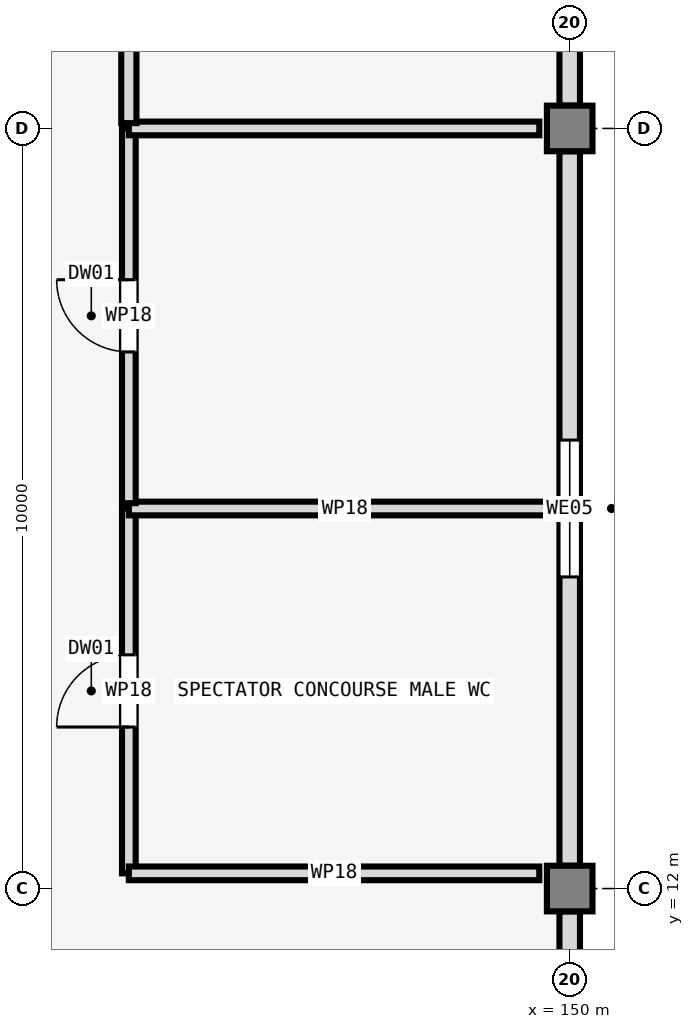
"""IFC4 building model, lengths in metres.
Left out: names, types, materials, properties, quantities, classifications, styles, units other than length and angle.
Written with IfcOpenShell. Run it as: python <this file> out.ifc"""

import sys

from ifc_helpers import new_model, si_unit, direction, frame, frame_2d, origin, origin_2d, place, context, subcontext, project, spatial, rectangle, extrude, element, fill, save


model = new_model("IFC4")
c1 = context("Model", 3, precision=1e-05, world=origin(), true_north=direction((0.0, 1.0)))
c2 = subcontext(c1, "Body", "Model", "MODEL_VIEW")
j1 = project(units=[si_unit("LENGTHUNIT", "METRE"), si_unit("PLANEANGLEUNIT", "RADIAN")], contexts=[c1])
p1 = place(None, origin())
s1 = spatial("IfcSite", under=j1, at=p1, CompositionType="ELEMENT")
p2 = place(p1, origin())
s2 = spatial("IfcBuilding", under=s1, at=p2, CompositionType="ELEMENT")
p3 = place(p2, frame((0.0, 0.0, 4.8)))
s3 = spatial("IfcBuildingStorey", under=s2, at=p3, CompositionType="ELEMENT", Elevation=4.8)
for number, where, z_axis, x_axis in (
    (1, (150.0, 12.0, 0.0), (0.0, 0.0, 1.0), (1.0, 0.0, 0.0)),
    (2, (150.0, 22.0, 0.0), (0.0, 0.0, 1.0), (1.0, 0.0, 0.0)),
):
    element("IfcColumn", number, at=place(p3, frame(where, z_axis=z_axis, x_axis=x_axis)), inside=s3, PredefinedType="COLUMN", context=c2, shape_type="SweptSolid", body=[
        extrude(rectangle(XDim=0.6, YDim=0.6, at=origin_2d()), origin(), (0.0, 0.0, 1.0), 4.5),
    ])
p4 = place(p3, frame((150.0, 6.3, 0.0), z_axis=(0.0, 0.0, 1.0), x_axis=(0.0, 1.0, 0.0)))
e3 = element("IfcWall", 3, at=p4, inside=s3, PredefinedType="SOLIDWALL", context=c2, shape_type="SweptSolid", body=[
    extrude(rectangle(XDim=5.4, YDim=0.27, at=frame_2d((2.7, 0.0))), origin(), (0.0, 0.0, 1.0), 3.5),
])
p5 = place(p4, frame((2.05, 0.0, 1.95)))
e4 = element("IfcOpeningElement", 4, at=p5, cuts=e3, PredefinedType="OPENING", context=c2, shape_type="SweptSolid", body=[
    extrude(rectangle(XDim=1.3, YDim=0.85, at=frame_2d((0.65, 0.425))), frame((0.0, 0.145, 0.0), z_axis=(0.0, -1.0, 0.0), x_axis=(1.0, 0.0, 0.0)), (0.0, 0.0, 1.0), 0.29),
])
p6 = place(p3, frame((150.0, 12.3, 0.0), z_axis=(0.0, 0.0, 1.0), x_axis=(0.0, 1.0, 0.0)))
e5 = element("IfcWall", 5, at=p6, inside=s3, PredefinedType="SOLIDWALL", context=c2, shape_type="SweptSolid", body=[
    extrude(rectangle(XDim=9.4, YDim=0.27, at=frame_2d((4.7, 0.0))), origin(), (0.0, 0.0, 1.0), 3.5),
])
p7 = place(p6, frame((3.8, 0.0, 1.2)))
e6 = element("IfcOpeningElement", 6, at=p7, cuts=e5, PredefinedType="OPENING", context=c2, shape_type="SweptSolid", body=[
    extrude(rectangle(XDim=1.8, YDim=1.5, at=frame_2d((0.9, 0.75))), frame((0.0, 0.145, 0.0), z_axis=(0.0, -1.0, 0.0), x_axis=(1.0, 0.0, 0.0)), (0.0, 0.0, 1.0), 0.29),
])
p8 = place(p3, frame((150.0, 22.3, 0.0), z_axis=(0.0, 0.0, 1.0), x_axis=(0.0, 1.0, 0.0)))
e7 = element("IfcWall", 7, at=p8, inside=s3, PredefinedType="SOLIDWALL", context=c2, shape_type="SweptSolid", body=[
    extrude(rectangle(XDim=8.4, YDim=0.27, at=frame_2d((4.2, 0.0))), origin(), (0.0, 0.0, 1.0), 3.5),
])
p9 = place(p8, frame((3.3, 0.0, 1.2)))
e8 = element("IfcOpeningElement", 8, at=p9, cuts=e7, PredefinedType="OPENING", context=c2, shape_type="SweptSolid", body=[
    extrude(rectangle(XDim=1.8, YDim=1.5, at=frame_2d((0.9, 0.75))), frame((0.0, 0.145, 0.0), z_axis=(0.0, -1.0, 0.0), x_axis=(1.0, 0.0, 0.0)), (0.0, 0.0, 1.0), 0.29),
])
p10 = place(p3, frame((144.2, 12.2, 0.0), z_axis=(0.0, 0.0, 1.0), x_axis=(0.0, 1.0, 0.0)))
e9 = element("IfcWall", 9, at=p10, inside=s3, PredefinedType="PARTITIONING", context=c2, shape_type="SweptSolid", body=[
    extrude(rectangle(XDim=4.8, YDim=0.18, at=frame_2d((2.4, 0.0))), origin(), (0.0, 0.0, 1.0), 3.4),
])
p11 = place(p10, frame((1.925, 0.0, 0.0)))
e10 = element("IfcOpeningElement", 10, at=p11, cuts=e9, PredefinedType="OPENING", context=c2, shape_type="SweptSolid", body=[
    extrude(rectangle(XDim=0.95, YDim=2.1, at=frame_2d((0.475, 1.05))), frame((0.0, 0.1, 0.0), z_axis=(0.0, -1.0, 0.0), x_axis=(1.0, 0.0, 0.0)), (0.0, 0.0, 1.0), 0.2),
])
p12 = place(p3, frame((149.6, 12.2, 0.0), z_axis=(0.0, 0.0, 1.0), x_axis=(-1.0, 0.0, 0.0)))
e11 = element("IfcWall", 11, at=p12, inside=s3, PredefinedType="PARTITIONING", context=c2, shape_type="SweptSolid", body=[
    extrude(rectangle(XDim=5.4, YDim=0.18, at=frame_2d((2.7, 0.0))), origin(), (0.0, 0.0, 1.0), 3.4),
])
p13 = place(p3, frame((144.2, 17.0, 0.0), z_axis=(0.0, 0.0, 1.0), x_axis=(1.0, 0.0, 0.0)))
e12 = element("IfcWall", 12, at=p13, inside=s3, PredefinedType="PARTITIONING", context=c2, shape_type="SweptSolid", body=[
    extrude(rectangle(XDim=5.685, YDim=0.18, at=frame_2d((2.843, 0.0))), origin(), (0.0, 0.0, 1.0), 3.4),
])
p14 = place(p3, frame((144.2, 17.07, 0.0), z_axis=(0.0, 0.0, 1.0), x_axis=(0.0, 1.0, 0.0)))
e13 = element("IfcWall", 13, at=p14, inside=s3, PredefinedType="PARTITIONING", context=c2, shape_type="SweptSolid", body=[
    extrude(rectangle(XDim=4.93, YDim=0.18, at=frame_2d((2.465, 0.0))), origin(), (0.0, 0.0, 1.0), 3.4),
])
p15 = place(p14, frame((1.99, 0.0, 0.0)))
e14 = element("IfcOpeningElement", 14, at=p15, cuts=e13, PredefinedType="OPENING", context=c2, shape_type="SweptSolid", body=[
    extrude(rectangle(XDim=0.95, YDim=2.1, at=frame_2d((0.475, 1.05))), frame((0.0, 0.1, 0.0), z_axis=(0.0, -1.0, 0.0), x_axis=(1.0, 0.0, 0.0)), (0.0, 0.0, 1.0), 0.2),
])
p16 = place(p3, frame((144.2, 22.0, 0.0), z_axis=(0.0, 0.0, 1.0), x_axis=(1.0, 0.0, 0.0)))
e15 = element("IfcWall", 15, at=p16, inside=s3, PredefinedType="PARTITIONING", context=c2, shape_type="SweptSolid", body=[
    extrude(rectangle(XDim=5.4, YDim=0.18, at=frame_2d((2.7, 0.0))), origin(), (0.0, 0.0, 1.0), 3.4),
])
p17 = place(p3, frame((144.2, 22.07, 0.0), z_axis=(0.0, 0.0, 1.0), x_axis=(0.0, 1.0, 0.0)))
e16 = element("IfcWall", 16, at=p17, inside=s3, PredefinedType="PARTITIONING", context=c2, shape_type="SweptSolid", body=[
    extrude(rectangle(XDim=17.859, YDim=0.2, at=frame_2d((8.929, 0.0))), origin(), (0.0, 0.0, 1.0), 3.4),
])
p18 = place(p17, frame((4.929, 0.0, 0.0)))
e17 = element("IfcOpeningElement", 17, at=p18, cuts=e16, PredefinedType="OPENING", context=c2, shape_type="SweptSolid", body=[
    extrude(rectangle(XDim=1.4, YDim=2.2, at=frame_2d((0.7, 1.1))), frame((0.0, 0.11, 0.0), z_axis=(0.0, -1.0, 0.0), x_axis=(1.0, 0.0, 0.0)), (0.0, 0.0, 1.0), 0.22),
])
p19 = place(p7, origin())
e18 = element("IfcWindow", 18, at=p19, inside=s3, PartitioningType="SINGLE_PANEL", PredefinedType="WINDOW", context=c2, shape_type="SweptSolid", body=[
    extrude(rectangle(XDim=1.8, YDim=1.5, at=frame_2d((0.9, 0.75))), frame((0.0, 0.03, 0.0), z_axis=(0.0, -1.0, 0.0), x_axis=(1.0, 0.0, 0.0)), (0.0, 0.0, 1.0), 0.06),
])
fill(e6, e18)
p20 = place(p11, origin())
e19 = element("IfcDoor", 19, at=p20, inside=s3, OperationType="SINGLE_SWING_LEFT", PredefinedType="DOOR", context=c2, shape_type="SweptSolid", body=[
    extrude(rectangle(XDim=0.95, YDim=2.1, at=frame_2d((0.475, 1.05))), frame((0.0, 0.025, 0.0), z_axis=(0.0, -1.0, 0.0), x_axis=(1.0, 0.0, 0.0)), (0.0, 0.0, 1.0), 0.05),
])
fill(e10, e19)
p21 = place(p15, origin())
e20 = element("IfcDoor", 20, at=p21, inside=s3, OperationType="SINGLE_SWING_RIGHT", PredefinedType="DOOR", context=c2, shape_type="SweptSolid", body=[
    extrude(rectangle(XDim=0.95, YDim=2.1, at=frame_2d((0.475, 1.05))), frame((0.0, 0.025, 0.0), z_axis=(0.0, -1.0, 0.0), x_axis=(1.0, 0.0, 0.0)), (0.0, 0.0, 1.0), 0.05),
])
fill(e14, e20)
save(model, sys.argv[1])
